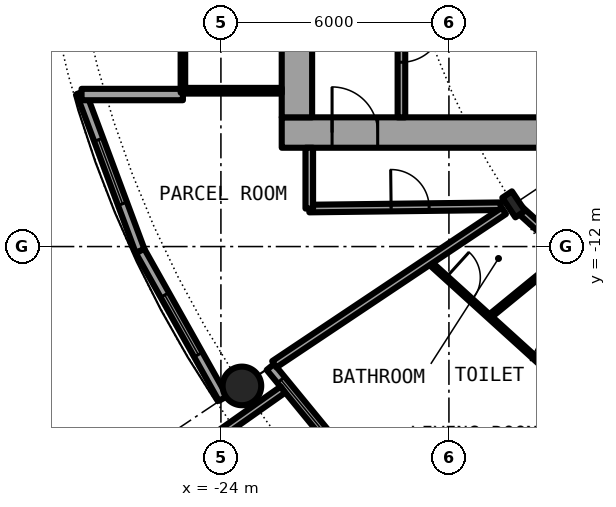
"""IFC4 building model, lengths in metres.
Left out: names, types, materials, properties, quantities, classifications, styles, units other than length and angle.
Written with IfcOpenShell. Run it as: python <this file> out.ifc"""

import sys

from ifc_helpers import new_model, si_unit, direction, frame, frame_2d, origin, origin_2d, place, context, subcontext, project, spatial, rectangle, hollow_circle, i_section, extrude, element, fill, save


model = new_model("IFC4")
c1 = context("Model", 3, precision=1e-05, world=origin(), true_north=direction((0.0, 1.0)))
c2 = subcontext(c1, "Body", "Model", "MODEL_VIEW")
j1 = project(units=[si_unit("LENGTHUNIT", "METRE"), si_unit("PLANEANGLEUNIT", "RADIAN")], contexts=[c1])
p1 = place(None, origin())
s1 = spatial("IfcSite", under=j1, at=p1, CompositionType="ELEMENT")
p2 = place(p1, origin())
s2 = spatial("IfcBuilding", under=s1, at=p2, CompositionType="ELEMENT")
p3 = place(p2, frame((0.0, 0.0, 41.1)))
s3 = spatial("IfcBuildingStorey", under=s2, at=p3, CompositionType="ELEMENT", Elevation=41.1)
p4 = place(p3, frame((-23.448, -15.667, 0.0), z_axis=(0.0, 0.0, 1.0), x_axis=(1.0, 0.0, 0.0)))
e1 = element("IfcColumn", 1, at=p4, inside=s3, PredefinedType="COLUMN", context=c2, shape_type="SweptSolid", body=[
    extrude(hollow_circle(Radius=0.508, WallThickness=0.05, at=origin_2d()), origin(), (0.0, 0.0, 1.0), 3.05),
])
p5 = place(p3, frame((-16.297, -10.889, 0.0), z_axis=(0.0, 0.0, 1.0), x_axis=(-0.831469612303, -0.55557023302, 0.0)))
e2 = element("IfcColumn", 2, at=p5, inside=s3, PredefinedType="COLUMN", context=c2, shape_type="SweptSolid", body=[
    extrude(i_section(OverallWidth=0.305, OverallDepth=0.62, WebThickness=0.021, FlangeThickness=0.04, FilletRadius=0.027, at=origin_2d()), origin(), (0.0, 0.0, 1.0), 3.05),
])
p6 = place(p3, frame((-22.699, -15.167, 0.0), z_axis=(0.0, 0.0, 1.0), x_axis=(0.634382322723, -0.773019449054, 0.0)))
e3 = element("IfcWall", 3, at=p6, inside=s3, PredefinedType="SOLIDWALL", context=c2, shape_type="SweptSolid", body=[
    extrude(rectangle(XDim=5.352, YDim=0.25, at=frame_2d((2.676, 0.0))), origin(), (0.0, 0.0, 1.0), 2.7),
])
p7 = place(p6, frame((0.441, 0.0, 0.3)))
e4 = element("IfcOpeningElement", 4, at=p7, cuts=e3, PredefinedType="OPENING", context=c2, shape_type="SweptSolid", body=[
    extrude(rectangle(XDim=1.8, YDim=2.1, at=frame_2d((0.9, 1.05))), frame((0.0, 0.135, 0.0), z_axis=(0.0, -1.0, 0.0), x_axis=(1.0, 0.0, 0.0)), (0.0, 0.0, 1.0), 0.27),
])
p8 = place(p6, frame((3.51, 0.0, 0.0)))
e5 = element("IfcOpeningElement", 5, at=p8, cuts=e3, PredefinedType="OPENING", context=c2, shape_type="SweptSolid", body=[
    extrude(rectangle(XDim=1.0, YDim=2.2, at=frame_2d((0.5, 1.1))), frame((0.0, 0.135, 0.0), z_axis=(0.0, -1.0, 0.0), x_axis=(1.0, 0.0, 0.0)), (0.0, 0.0, 1.0), 0.27),
])
p9 = place(p3, frame((-22.37, -15.765, -0.03), z_axis=(0.0, 0.0, 1.0), x_axis=(-0.817256123454, -0.576274612209, 0.0)))
e6 = element("IfcWall", 6, at=p9, inside=s3, PredefinedType="SOLIDWALL", context=c2, shape_type="SweptSolid", body=[
    extrude(rectangle(XDim=2.933, YDim=0.2, at=frame_2d((1.466, 0.0))), origin(), (0.0, 0.0, 1.0), 2.73),
])
p10 = place(p3, frame((-27.682, -7.945, 0.0), z_axis=(0.0, 0.0, 1.0), x_axis=(0.349247811493, -0.937030397675, 0.0)))
e7 = element("IfcWall", 7, at=p10, inside=s3, PredefinedType="SOLIDWALL", context=c2, shape_type="SweptSolid", body=[
    extrude(rectangle(XDim=4.452, YDim=0.25, at=frame_2d((2.226, 0.0))), origin(), (0.0, 0.0, 1.0), 2.7),
])
p11 = place(p10, frame((1.327, 0.0, 0.3)))
e8 = element("IfcOpeningElement", 8, at=p11, cuts=e7, PredefinedType="OPENING", context=c2, shape_type="SweptSolid", body=[
    extrude(rectangle(XDim=1.8, YDim=2.1, at=frame_2d((0.9, 1.05))), frame((0.0, 0.135, 0.0), z_axis=(0.0, -1.0, 0.0), x_axis=(1.0, 0.0, 0.0)), (0.0, 0.0, 1.0), 0.27),
])
p12 = place(p3, frame((-26.127, -12.117, 0.0), z_axis=(0.0, 0.0, 1.0), x_axis=(0.489696356642, -0.871893042919, 0.0)))
e9 = element("IfcWall", 9, at=p12, inside=s3, PredefinedType="SOLIDWALL", context=c2, shape_type="SweptSolid", body=[
    extrude(rectangle(XDim=4.454, YDim=0.25, at=frame_2d((2.227, 0.0))), origin(), (0.0, 0.0, 1.0), 2.7),
])
p13 = place(p12, frame((1.327, 0.0, 0.3)))
e10 = element("IfcOpeningElement", 10, at=p13, cuts=e9, PredefinedType="OPENING", context=c2, shape_type="SweptSolid", body=[
    extrude(rectangle(XDim=1.8, YDim=2.1, at=frame_2d((0.9, 1.05))), frame((0.0, 0.135, 0.0), z_axis=(0.0, -1.0, 0.0), x_axis=(1.0, 0.0, 0.0)), (0.0, 0.0, 1.0), 0.27),
])
p14 = place(p3, frame((-25.0, -8.0, 0.0), z_axis=(0.0, 0.0, 1.0), x_axis=(-1.0, 0.0, 0.0)))
e11 = element("IfcWall", 11, at=p14, inside=s3, PredefinedType="SOLIDWALL", context=c2, shape_type="SweptSolid", body=[
    extrude(rectangle(XDim=2.667, YDim=0.3, at=frame_2d((1.333, 0.0))), origin(), (0.0, 0.0, 1.0), 2.7),
])
p15 = place(p3, frame((-22.4, -9.0, 0.0), z_axis=(0.0, 0.0, 1.0), x_axis=(1.0, 0.0, 0.0)))
e12 = element("IfcWall", 12, at=p15, inside=s3, PredefinedType="SHEAR", context=c2, shape_type="SweptSolid", body=[
    extrude(rectangle(XDim=14.2, YDim=0.8, at=frame_2d((7.1, 0.0))), origin(), (0.0, 0.0, 1.0), 3.05),
])
p16 = place(p15, frame((1.325, 0.0, 0.0)))
e13 = element("IfcOpeningElement", 13, at=p16, cuts=e12, PredefinedType="OPENING", context=c2, shape_type="SweptSolid", body=[
    extrude(rectangle(XDim=1.2, YDim=2.3, at=frame_2d((0.6, 1.15))), frame((0.0, 0.41, 0.0), z_axis=(0.0, -1.0, 0.0), x_axis=(1.0, 0.0, 0.0)), (0.0, 0.0, 1.0), 0.82),
])
p17 = place(p3, frame((-22.0, -8.6, 0.0), z_axis=(0.0, 0.0, 1.0), x_axis=(0.0, 1.0, 0.0)))
e14 = element("IfcWall", 14, at=p17, inside=s3, PredefinedType="SHEAR", context=c2, shape_type="SweptSolid", body=[
    extrude(rectangle(XDim=17.2, YDim=0.8, at=frame_2d((8.6, 0.0))), origin(), (0.0, 0.0, 1.0), 3.05),
])
p18 = place(p17, frame((7.7, 0.0, 0.0)))
e15 = element("IfcOpeningElement", 15, at=p18, cuts=e14, PredefinedType="OPENING", context=c2, shape_type="SweptSolid", body=[
    extrude(rectangle(XDim=1.8, YDim=2.3, at=frame_2d((0.9, 1.15))), frame((0.0, 0.41, 0.0), z_axis=(0.0, -1.0, 0.0), x_axis=(1.0, 0.0, 0.0)), (0.0, 0.0, 1.0), 0.82),
])
p19 = place(p3, frame((-19.25, -1.575, 0.0), z_axis=(0.0, 0.0, 1.0), x_axis=(0.0, -1.0, 0.0)))
e16 = element("IfcWall", 16, at=p19, inside=s3, PredefinedType="SOLIDWALL", context=c2, shape_type="SweptSolid", body=[
    extrude(rectangle(XDim=7.025, YDim=0.2, at=frame_2d((3.513, 0.0))), origin(), (0.0, 0.0, 1.0), 2.7),
])
p20 = place(p19, frame((4.475, 0.0, 0.0)))
e17 = element("IfcOpeningElement", 17, at=p20, cuts=e16, PredefinedType="OPENING", context=c2, shape_type="SweptSolid", body=[
    extrude(rectangle(XDim=1.1, YDim=2.3, at=frame_2d((0.55, 1.15))), frame((0.0, 0.11, 0.0), z_axis=(0.0, -1.0, 0.0), x_axis=(1.0, 0.0, 0.0)), (0.0, 0.0, 1.0), 0.22),
])
p21 = place(p3, frame((-22.4, -7.9, 0.0), z_axis=(0.0, 0.0, 1.0), x_axis=(-1.0, 0.0, 0.0)))
e18 = element("IfcWall", 18, at=p21, inside=s3, PredefinedType="PARTITIONING", context=c2, shape_type="SweptSolid", body=[
    extrude(rectangle(XDim=2.54, YDim=0.15, at=frame_2d((1.27, 0.0))), origin(), (0.0, 0.0, 1.0), 2.7),
])
p22 = place(p3, frame((-25.0, 7.95, 0.0), z_axis=(0.0, 0.0, 1.0), x_axis=(0.0, -1.0, 0.0)))
e19 = element("IfcWall", 19, at=p22, inside=s3, PredefinedType="PARTITIONING", context=c2, shape_type="SweptSolid", body=[
    extrude(rectangle(XDim=15.9, YDim=0.12, at=frame_2d((7.95, 0.0))), origin(), (0.0, 0.0, 1.0), 2.7),
])
p23 = place(p22, frame((0.95, 0.0, 0.1)))
e20 = element("IfcOpeningElement", 20, at=p23, cuts=e19, PredefinedType="OPENING", context=c2, shape_type="SweptSolid", body=[
    extrude(rectangle(XDim=14.0, YDim=2.35, at=frame_2d((7.0, 1.175))), frame((0.0, 0.07, 0.0), z_axis=(0.0, -1.0, 0.0), x_axis=(1.0, 0.0, 0.0)), (0.0, 0.0, 1.0), 0.14),
])
p24 = place(p3, frame((-18.545, -12.387, 0.0), z_axis=(0.0, 0.0, 1.0), x_axis=(0.740948416939, -0.671561943112, 0.0)))
e21 = element("IfcWall", 21, at=p24, inside=s3, PredefinedType="PARTITIONING", context=c2, shape_type="SweptSolid", body=[
    extrude(rectangle(XDim=4.335, YDim=0.1, at=frame_2d((2.167, 0.0))), origin(), (0.0, 0.0, 1.0), 2.7),
])
p25 = place(p24, frame((0.636, 0.0, 0.0)))
e22 = element("IfcOpeningElement", 22, at=p25, cuts=e21, PredefinedType="OPENING", context=c2, shape_type="SweptSolid", body=[
    extrude(rectangle(XDim=0.9, YDim=2.3, at=frame_2d((0.45, 1.15))), frame((0.0, 0.06, 0.0), z_axis=(0.0, -1.0, 0.0), x_axis=(1.0, 0.0, 0.0)), (0.0, 0.0, 1.0), 0.12),
])
p26 = place(p3, frame((-16.179, -10.994, 0.0), z_axis=(0.0, 0.0, 1.0), x_axis=(0.740659568799, -0.671880497668, 0.0)))
e23 = element("IfcWall", 23, at=p26, inside=s3, PredefinedType="PARTITIONING", context=c2, shape_type="SweptSolid", body=[
    extrude(rectangle(XDim=9.36, YDim=0.2, at=frame_2d((4.68, 0.0))), origin(), (0.0, 0.0, 1.0), 2.38),
])
p27 = place(p26, frame((4.105, 0.0, 0.0)))
e24 = element("IfcOpeningElement", 24, at=p27, cuts=e23, PredefinedType="OPENING", context=c2, shape_type="SweptSolid", body=[
    extrude(rectangle(XDim=1.0, YDim=2.3, at=frame_2d((0.5, 1.15))), frame((0.0, 0.11, 0.0), z_axis=(0.0, -1.0, 0.0), x_axis=(1.0, 0.0, 0.0)), (0.0, 0.0, 1.0), 0.22),
])
p28 = place(p3, frame((-21.675, -11.0, 0.0), z_axis=(0.0, 0.0, 1.0), x_axis=(0.999926652916, 0.012111514691, 0.0)))
e25 = element("IfcWall", 25, at=p28, inside=s3, PredefinedType="PARTITIONING", context=c2, shape_type="SweptSolid", body=[
    extrude(rectangle(XDim=5.04, YDim=0.2, at=frame_2d((2.52, 0.0))), origin(), (0.0, 0.0, 1.0), 2.7),
])
p29 = place(p28, frame((2.154, 0.0, 0.0)))
e26 = element("IfcOpeningElement", 26, at=p29, cuts=e25, PredefinedType="OPENING", context=c2, shape_type="SweptSolid", body=[
    extrude(rectangle(XDim=1.0, YDim=2.3, at=frame_2d((0.5, 1.15))), frame((0.0, 0.11, 0.0), z_axis=(0.0, -1.0, 0.0), x_axis=(1.0, 0.0, 0.0)), (0.0, 0.0, 1.0), 0.22),
])
p30 = place(p3, frame((-22.595, -15.097, 0.0), z_axis=(0.0, 0.0, 1.0), x_axis=(0.831465568067, 0.555576285599, 0.0)))
e27 = element("IfcWall", 27, at=p30, inside=s3, PredefinedType="PARTITIONING", context=c2, shape_type="SweptSolid", body=[
    extrude(rectangle(XDim=7.264, YDim=0.2, at=frame_2d((3.632, 0.0))), origin(), (0.0, 0.0, 1.0), 2.7),
])
p31 = place(p3, frame((-17.22, -21.022, 0.0), z_axis=(0.0, 0.0, 1.0), x_axis=(0.633794691983, 0.773501317655, 0.0)))
e28 = element("IfcWall", 28, at=p31, inside=s3, PredefinedType="PARTITIONING", context=c2, shape_type="SweptSolid", body=[
    extrude(rectangle(XDim=8.138, YDim=0.1, at=frame_2d((4.069, 0.0))), origin(), (0.0, 0.0, 1.0), 2.7),
])
p32 = place(p31, frame((6.377, 0.0, 0.0)))
e29 = element("IfcOpeningElement", 29, at=p32, cuts=e28, PredefinedType="OPENING", context=c2, shape_type="SweptSolid", body=[
    extrude(rectangle(XDim=0.9, YDim=2.3, at=frame_2d((0.45, 1.15))), frame((0.0, 0.06, 0.0), z_axis=(0.0, -1.0, 0.0), x_axis=(1.0, 0.0, 0.0)), (0.0, 0.0, 1.0), 0.12),
])
p33 = place(p31, frame((2.306, 0.0, 0.0)))
e30 = element("IfcOpeningElement", 30, at=p33, cuts=e28, PredefinedType="OPENING", context=c2, shape_type="SweptSolid", body=[
    extrude(rectangle(XDim=0.9, YDim=2.3, at=frame_2d((0.45, 1.15))), frame((0.0, 0.06, 0.0), z_axis=(0.0, -1.0, 0.0), x_axis=(1.0, 0.0, 0.0)), (0.0, 0.0, 1.0), 0.12),
])
p34 = place(p3, frame((-16.936, -13.845, 0.0), z_axis=(0.0, 0.0, 1.0), x_axis=(0.774162545943, 0.632986850147, 0.0)))
e31 = element("IfcWall", 31, at=p34, inside=s3, PredefinedType="PARTITIONING", context=c2, shape_type="SweptSolid", body=[
    extrude(rectangle(XDim=2.649, YDim=0.1, at=frame_2d((1.325, 0.0))), origin(), (0.0, 0.0, 1.0), 2.7),
])
p35 = place(p3, frame((-21.675, -11.0, 0.0), z_axis=(0.0, 0.0, 1.0), x_axis=(0.0, 1.0, 0.0)))
e32 = element("IfcWall", 32, at=p35, inside=s3, PredefinedType="PARTITIONING", context=c2, shape_type="SweptSolid", body=[
    extrude(rectangle(XDim=1.6, YDim=0.2, at=frame_2d((0.8, 0.0))), origin(), (0.0, 0.0, 1.0), 2.7),
])
p36 = place(p7, origin())
e33 = element("IfcWindow", 33, at=p36, inside=s3, PartitioningType="SINGLE_PANEL", PredefinedType="WINDOW", context=c2, shape_type="SweptSolid", body=[
    extrude(rectangle(XDim=1.8, YDim=2.1, at=frame_2d((0.9, 1.05))), frame((0.0, 0.03, 0.0), z_axis=(0.0, -1.0, 0.0), x_axis=(1.0, 0.0, 0.0)), (0.0, 0.0, 1.0), 0.06),
])
fill(e4, e33)
p37 = place(p11, origin())
e34 = element("IfcWindow", 34, at=p37, inside=s3, PartitioningType="SINGLE_PANEL", PredefinedType="WINDOW", context=c2, shape_type="SweptSolid", body=[
    extrude(rectangle(XDim=1.8, YDim=2.1, at=frame_2d((0.9, 1.05))), frame((0.0, 0.03, 0.0), z_axis=(0.0, -1.0, 0.0), x_axis=(1.0, 0.0, 0.0)), (0.0, 0.0, 1.0), 0.06),
])
fill(e8, e34)
p38 = place(p13, origin())
e35 = element("IfcWindow", 35, at=p38, inside=s3, PartitioningType="SINGLE_PANEL", PredefinedType="WINDOW", context=c2, shape_type="SweptSolid", body=[
    extrude(rectangle(XDim=1.8, YDim=2.1, at=frame_2d((0.9, 1.05))), frame((0.0, 0.03, 0.0), z_axis=(0.0, -1.0, 0.0), x_axis=(1.0, 0.0, 0.0)), (0.0, 0.0, 1.0), 0.06),
])
fill(e10, e35)
p39 = place(p20, origin())
e36 = element("IfcDoor", 36, at=p39, inside=s3, OperationType="SINGLE_SWING_LEFT", PredefinedType="DOOR", context=c2, shape_type="SweptSolid", body=[
    extrude(rectangle(XDim=1.1, YDim=2.3, at=frame_2d((0.55, 1.15))), frame((0.0, 0.025, 0.0), z_axis=(0.0, -1.0, 0.0), x_axis=(1.0, 0.0, 0.0)), (0.0, 0.0, 1.0), 0.05),
])
fill(e17, e36)
p40 = place(p16, origin())
e37 = element("IfcDoor", 37, at=p40, inside=s3, OperationType="SINGLE_SWING_RIGHT", PredefinedType="DOOR", context=c2, shape_type="SweptSolid", body=[
    extrude(rectangle(XDim=1.2, YDim=2.3, at=frame_2d((0.6, 1.15))), frame((0.0, 0.025, 0.0), z_axis=(0.0, -1.0, 0.0), x_axis=(1.0, 0.0, 0.0)), (0.0, 0.0, 1.0), 0.05),
])
fill(e13, e37)
p41 = place(p23, origin())
e38 = element("IfcWindow", 38, at=p41, inside=s3, PartitioningType="SINGLE_PANEL", PredefinedType="WINDOW", context=c2, shape_type="SweptSolid", body=[
    extrude(rectangle(XDim=14.0, YDim=2.35, at=frame_2d((7.0, 1.175))), frame((0.0, 0.03, 0.0), z_axis=(0.0, -1.0, 0.0), x_axis=(1.0, 0.0, 0.0)), (0.0, 0.0, 1.0), 0.06),
])
fill(e20, e38)
p42 = place(p25, origin())
e39 = element("IfcDoor", 39, at=p42, inside=s3, OperationType="SINGLE_SWING_LEFT", PredefinedType="DOOR", context=c2, shape_type="SweptSolid", body=[
    extrude(rectangle(XDim=0.9, YDim=2.3, at=frame_2d((0.45, 1.15))), frame((0.0, 0.025, 0.0), z_axis=(0.0, -1.0, 0.0), x_axis=(1.0, 0.0, 0.0)), (0.0, 0.0, 1.0), 0.05),
])
fill(e22, e39)
p43 = place(p29, origin())
e40 = element("IfcDoor", 40, at=p43, inside=s3, OperationType="SINGLE_SWING_RIGHT", PredefinedType="DOOR", context=c2, shape_type="SweptSolid", body=[
    extrude(rectangle(XDim=1.0, YDim=2.3, at=frame_2d((0.5, 1.15))), frame((0.0, 0.025, 0.0), z_axis=(0.0, -1.0, 0.0), x_axis=(1.0, 0.0, 0.0)), (0.0, 0.0, 1.0), 0.05),
])
fill(e26, e40)
save(model, sys.argv[1])
